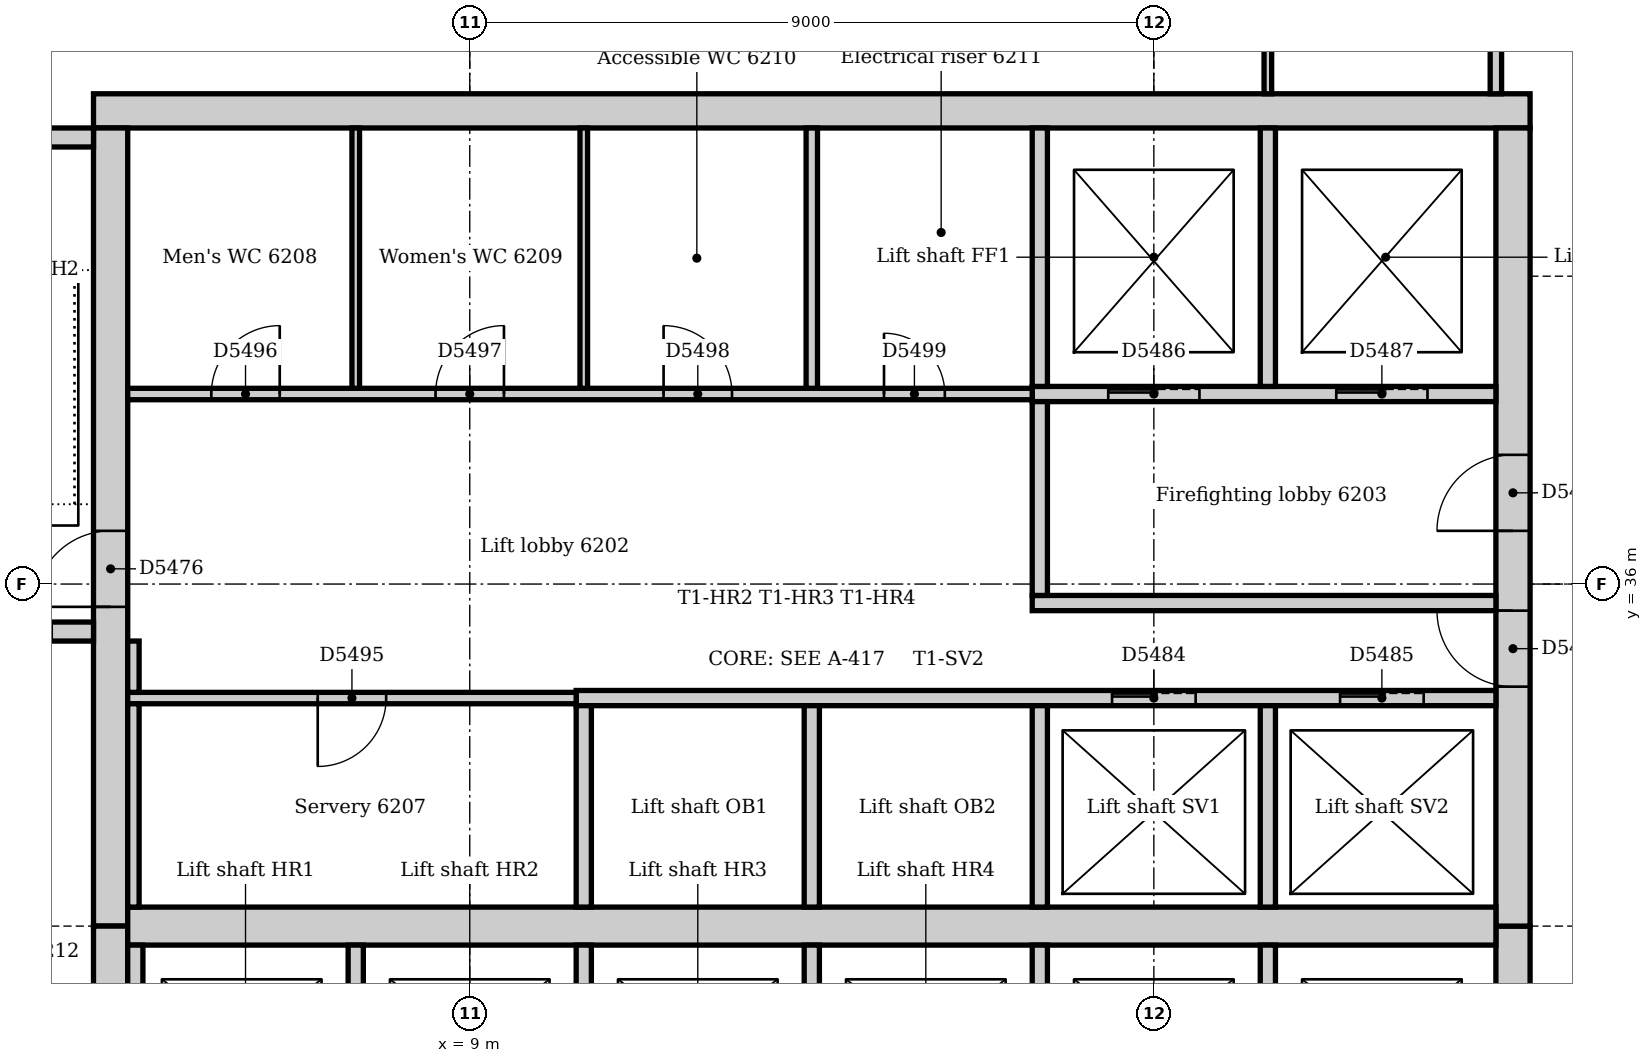
"""IFC4 building model, lengths in metres.
Left out: names, types, materials, properties, quantities, classifications, styles, units other than length and angle.
Written with IfcOpenShell. Run it as: python <this file> out.ifc"""

import sys

from ifc_helpers import new_model, si_unit, direction, frame, frame_2d, origin, place, context, subcontext, project, spatial, rectangle, extrude, element, fill, save


model = new_model("IFC4")
c1 = context("Model", 3, precision=1e-05, world=origin(), true_north=direction((0.0, 1.0)))
c2 = subcontext(c1, "Body", "Model", "MODEL_VIEW")
j1 = project(units=[si_unit("LENGTHUNIT", "METRE"), si_unit("PLANEANGLEUNIT", "RADIAN")], contexts=[c1])
p1 = place(None, origin())
s1 = spatial("IfcSite", under=j1, at=p1, CompositionType="ELEMENT")
p2 = place(p1, origin())
s2 = spatial("IfcBuilding", under=s1, at=p2, CompositionType="ELEMENT")
p3 = place(p2, frame((0.0, 0.0, 259.0)))
s3 = spatial("IfcBuildingStorey", under=s2, at=p3, CompositionType="ELEMENT", Elevation=259.0)
p4 = place(p3, frame((22.95, 42.225, 0.0), z_axis=(0.0, 0.0, 1.0), x_axis=(-1.0, 0.0, 0.0)))
e1 = element("IfcWall", 1, at=p4, inside=s3, PredefinedType="SOLIDWALL", context=c2, shape_type="SweptSolid", body=[
    extrude(rectangle(XDim=18.9, YDim=0.45, at=frame_2d((9.45, 0.0))), origin(), (0.0, 0.0, 1.0), 4.0),
])
p5 = place(p3, frame((22.725, 21.0, 0.0), z_axis=(0.0, 0.0, 1.0), x_axis=(0.0, 1.0, 0.0)))
e2 = element("IfcWall", 2, at=p5, inside=s3, PredefinedType="SOLIDWALL", context=c2, shape_type="SweptSolid", body=[
    extrude(rectangle(XDim=10.5, YDim=0.45, at=frame_2d((5.25, 0.0))), origin(), (0.0, 0.0, 1.0), 4.0),
])
p6 = place(p5, frame((4.35, 0.0, 0.0)))
e3 = element("IfcOpeningElement", 3, at=p6, cuts=e2, PredefinedType="OPENING", context=c2, shape_type="SweptSolid", body=[
    extrude(rectangle(XDim=1.8, YDim=2.1, at=frame_2d((0.9, 1.05))), frame((0.0, 0.235, 0.0), z_axis=(0.0, -1.0, 0.0), x_axis=(1.0, 0.0, 0.0)), (0.0, 0.0, 1.0), 0.47),
])
p7 = place(p3, frame((22.725, 31.5, 0.0), z_axis=(0.0, 0.0, 1.0), x_axis=(0.0, 1.0, 0.0)))
e4 = element("IfcWall", 4, at=p7, inside=s3, PredefinedType="SOLIDWALL", context=c2, shape_type="SweptSolid", body=[
    extrude(rectangle(XDim=10.5, YDim=0.45, at=frame_2d((5.25, 0.0))), origin(), (0.0, 0.0, 1.0), 4.0),
])
p8 = place(p7, frame((3.15, 0.0, 0.0)))
e5 = element("IfcOpeningElement", 5, at=p8, cuts=e4, PredefinedType="OPENING", context=c2, shape_type="SweptSolid", body=[
    extrude(rectangle(XDim=1.0, YDim=2.1, at=frame_2d((0.5, 1.05))), frame((0.0, 0.235, 0.0), z_axis=(0.0, -1.0, 0.0), x_axis=(1.0, 0.0, 0.0)), (0.0, 0.0, 1.0), 0.47),
])
p9 = place(p7, frame((5.2, 0.0, 0.0)))
e6 = element("IfcOpeningElement", 6, at=p9, cuts=e4, PredefinedType="OPENING", context=c2, shape_type="SweptSolid", body=[
    extrude(rectangle(XDim=1.0, YDim=2.1, at=frame_2d((0.5, 1.05))), frame((0.0, 0.235, 0.0), z_axis=(0.0, -1.0, 0.0), x_axis=(1.0, 0.0, 0.0)), (0.0, 0.0, 1.0), 0.47),
])
p10 = place(p3, frame((4.275, 42.0, 0.0), z_axis=(0.0, 0.0, 1.0), x_axis=(0.0, -1.0, 0.0)))
e7 = element("IfcWall", 7, at=p10, inside=s3, PredefinedType="SOLIDWALL", context=c2, shape_type="SweptSolid", body=[
    extrude(rectangle(XDim=10.5, YDim=0.45, at=frame_2d((5.25, 0.0))), origin(), (0.0, 0.0, 1.0), 4.0),
])
p11 = place(p10, frame((5.3, 0.0, 0.0)))
e8 = element("IfcOpeningElement", 8, at=p11, cuts=e7, PredefinedType="OPENING", context=c2, shape_type="SweptSolid", body=[
    extrude(rectangle(XDim=1.0, YDim=2.1, at=frame_2d((0.5, 1.05))), frame((0.0, 0.235, 0.0), z_axis=(0.0, -1.0, 0.0), x_axis=(1.0, 0.0, 0.0)), (0.0, 0.0, 1.0), 0.47),
])
p12 = place(p3, frame((4.275, 31.5, 0.0), z_axis=(0.0, 0.0, 1.0), x_axis=(0.0, -1.0, 0.0)))
e9 = element("IfcWall", 9, at=p12, inside=s3, PredefinedType="SOLIDWALL", context=c2, shape_type="SweptSolid", body=[
    extrude(rectangle(XDim=10.5, YDim=0.45, at=frame_2d((5.25, 0.0))), origin(), (0.0, 0.0, 1.0), 4.0),
])
p13 = place(p12, frame((4.25, 0.0, 0.0)))
e10 = element("IfcOpeningElement", 10, at=p13, cuts=e9, PredefinedType="OPENING", context=c2, shape_type="SweptSolid", body=[
    extrude(rectangle(XDim=1.0, YDim=2.1, at=frame_2d((0.5, 1.05))), frame((0.0, 0.235, 0.0), z_axis=(0.0, -1.0, 0.0), x_axis=(1.0, 0.0, 0.0)), (0.0, 0.0, 1.0), 0.47),
])
p14 = place(p3, frame((4.5, 31.5, 0.0), z_axis=(0.0, 0.0, 1.0), x_axis=(1.0, 0.0, 0.0)))
e11 = element("IfcWall", 11, at=p14, inside=s3, PredefinedType="SOLIDWALL", context=c2, shape_type="SweptSolid", body=[
    extrude(rectangle(XDim=18.0, YDim=0.5, at=frame_2d((9.0, 0.0))), origin(), (0.0, 0.0, 1.0), 4.0),
])
p15 = place(p3, frame((0.36, 35.375, 0.0), z_axis=(0.0, 0.0, 1.0), x_axis=(1.0, 0.0, 0.0)))
e12 = element("IfcWall", 12, at=p15, inside=s3, PredefinedType="SOLIDWALL", context=c2, shape_type="SweptSolid", body=[
    extrude(rectangle(XDim=3.69, YDim=0.25, at=frame_2d((1.845, 0.0))), origin(), (0.0, 0.0, 1.0), 4.0),
])
p16 = place(p15, frame((2.14, 0.0, 0.0)))
e13 = element("IfcOpeningElement", 13, at=p16, cuts=e12, PredefinedType="OPENING", context=c2, shape_type="SweptSolid", body=[
    extrude(rectangle(XDim=1.0, YDim=2.1, at=frame_2d((0.5, 1.05))), frame((0.0, 0.135, 0.0), z_axis=(0.0, -1.0, 0.0), x_axis=(1.0, 0.0, 0.0)), (0.0, 0.0, 1.0), 0.27),
])
p17 = place(p3, frame((4.05, 41.875, 0.0), z_axis=(0.0, 0.0, 1.0), x_axis=(-1.0, 0.0, 0.0)))
e14 = element("IfcWall", 14, at=p17, inside=s3, PredefinedType="SOLIDWALL", context=c2, shape_type="SweptSolid", body=[
    extrude(rectangle(XDim=3.69, YDim=0.25, at=frame_2d((1.845, 0.0))), origin(), (0.0, 0.0, 1.0), 4.0),
])
p18 = place(p3, frame((16.4, 35.75, 0.0), z_axis=(0.0, 0.0, 1.0), x_axis=(1.0, 0.0, 0.0)))
e15 = element("IfcWall", 15, at=p18, inside=s3, PredefinedType="PARTITIONING", context=c2, shape_type="SweptSolid", body=[
    extrude(rectangle(XDim=6.1, YDim=0.2, at=frame_2d((3.05, 0.0))), origin(), (0.0, 0.0, 1.0), 3.85),
])
p19 = place(p3, frame((16.4, 38.5, 0.0), z_axis=(0.0, 0.0, 1.0), x_axis=(1.0, 0.0, 0.0)))
e16 = element("IfcWall", 16, at=p19, inside=s3, PredefinedType="PARTITIONING", context=c2, shape_type="SweptSolid", body=[
    extrude(rectangle(XDim=6.1, YDim=0.2, at=frame_2d((3.05, 0.0))), origin(), (0.0, 0.0, 1.0), 3.85),
])
p20 = place(p19, frame((1.0, 0.0, 0.0)))
e17 = element("IfcOpeningElement", 17, at=p20, cuts=e16, PredefinedType="OPENING", context=c2, shape_type="SweptSolid", body=[
    extrude(rectangle(XDim=1.2, YDim=2.1, at=frame_2d((0.6, 1.05))), frame((0.0, 0.11, 0.0), z_axis=(0.0, -1.0, 0.0), x_axis=(1.0, 0.0, 0.0)), (0.0, 0.0, 1.0), 0.22),
])
p21 = place(p19, frame((4.0, 0.0, 0.0)))
e18 = element("IfcOpeningElement", 18, at=p21, cuts=e16, PredefinedType="OPENING", context=c2, shape_type="SweptSolid", body=[
    extrude(rectangle(XDim=1.2, YDim=2.1, at=frame_2d((0.6, 1.05))), frame((0.0, 0.11, 0.0), z_axis=(0.0, -1.0, 0.0), x_axis=(1.0, 0.0, 0.0)), (0.0, 0.0, 1.0), 0.22),
])
p22 = place(p3, frame((16.5, 35.85, 0.0), z_axis=(0.0, 0.0, 1.0), x_axis=(0.0, 1.0, 0.0)))
e19 = element("IfcWall", 19, at=p22, inside=s3, PredefinedType="PARTITIONING", context=c2, shape_type="SweptSolid", body=[
    extrude(rectangle(XDim=2.55, YDim=0.2, at=frame_2d((1.275, 0.0))), origin(), (0.0, 0.0, 1.0), 3.85),
])
p23 = place(p3, frame((10.4, 34.5, 0.0), z_axis=(0.0, 0.0, 1.0), x_axis=(1.0, 0.0, 0.0)))
e20 = element("IfcWall", 20, at=p23, inside=s3, PredefinedType="PARTITIONING", context=c2, shape_type="SweptSolid", body=[
    extrude(rectangle(XDim=12.1, YDim=0.2, at=frame_2d((6.05, 0.0))), origin(), (0.0, 0.0, 1.0), 3.85),
])
p24 = place(p23, frame((7.05, 0.0, 0.0)))
e21 = element("IfcOpeningElement", 21, at=p24, cuts=e20, PredefinedType="OPENING", context=c2, shape_type="SweptSolid", body=[
    extrude(rectangle(XDim=1.1, YDim=2.1, at=frame_2d((0.55, 1.05))), frame((0.0, 0.11, 0.0), z_axis=(0.0, -1.0, 0.0), x_axis=(1.0, 0.0, 0.0)), (0.0, 0.0, 1.0), 0.22),
])
p25 = place(p23, frame((10.05, 0.0, 0.0)))
e22 = element("IfcOpeningElement", 22, at=p25, cuts=e20, PredefinedType="OPENING", context=c2, shape_type="SweptSolid", body=[
    extrude(rectangle(XDim=1.1, YDim=2.1, at=frame_2d((0.55, 1.05))), frame((0.0, 0.11, 0.0), z_axis=(0.0, -1.0, 0.0), x_axis=(1.0, 0.0, 0.0)), (0.0, 0.0, 1.0), 0.22),
])
for number, where, z_axis, x_axis in (
    (23, (10.5, 28.6, 0.0), (0.0, 0.0, 1.0), (0.0, 1.0, 0.0)),
    (24, (10.5, 31.75, 0.0), (0.0, 0.0, 1.0), (0.0, 1.0, 0.0)),
    (25, (13.5, 28.6, 0.0), (0.0, 0.0, 1.0), (0.0, 1.0, 0.0)),
    (26, (13.5, 31.75, 0.0), (0.0, 0.0, 1.0), (0.0, 1.0, 0.0)),
    (27, (16.5, 28.6, 0.0), (0.0, 0.0, 1.0), (0.0, 1.0, 0.0)),
    (28, (16.5, 31.75, 0.0), (0.0, 0.0, 1.0), (0.0, 1.0, 0.0)),
    (29, (19.5, 28.6, 0.0), (0.0, 0.0, 1.0), (0.0, 1.0, 0.0)),
    (30, (19.5, 31.75, 0.0), (0.0, 0.0, 1.0), (0.0, 1.0, 0.0)),
):
    element("IfcWall", number, at=place(p3, frame(where, z_axis=z_axis, x_axis=x_axis)), inside=s3, PredefinedType="PARTITIONING", context=c2, shape_type="SweptSolid", body=[
        extrude(rectangle(XDim=2.65, YDim=0.2, at=frame_2d((1.325, 0.0))), origin(), (0.0, 0.0, 1.0), 3.85),
    ])
for number, where, z_axis, x_axis in (
    (31, (16.5, 38.6, 0.0), (0.0, 0.0, 1.0), (0.0, 1.0, 0.0)),
    (32, (19.5, 38.6, 0.0), (0.0, 0.0, 1.0), (0.0, 1.0, 0.0)),
):
    element("IfcWall", number, at=place(p3, frame(where, z_axis=z_axis, x_axis=x_axis)), inside=s3, PredefinedType="PARTITIONING", context=c2, shape_type="SweptSolid", body=[
        extrude(rectangle(XDim=3.4, YDim=0.2, at=frame_2d((1.7, 0.0))), origin(), (0.0, 0.0, 1.0), 3.85),
    ])
for number, where, z_axis, x_axis in (
    (33, (4.6, 28.6, 0.0), (0.0, 0.0, 1.0), (0.0, 1.0, 0.0)),
    (34, (7.5, 28.6, 0.0), (0.0, 0.0, 1.0), (0.0, 1.0, 0.0)),
):
    element("IfcWall", number, at=place(p3, frame(where, z_axis=z_axis, x_axis=x_axis)), inside=s3, PredefinedType="PARTITIONING", context=c2, shape_type="SweptSolid", body=[
        extrude(rectangle(XDim=2.65, YDim=0.2, at=frame_2d((1.325, 0.0))), origin(), (0.0, 0.0, 1.0), 3.85),
    ])
p26 = place(p3, frame((4.5, 38.5, 0.0), z_axis=(0.0, 0.0, 1.0), x_axis=(1.0, 0.0, 0.0)))
e35 = element("IfcWall", 35, at=p26, inside=s3, PredefinedType="PARTITIONING", context=c2, shape_type="SweptSolid", body=[
    extrude(rectangle(XDim=11.9, YDim=0.15, at=frame_2d((5.95, 0.0))), origin(), (0.0, 0.0, 1.0), 3.85),
])
p27 = place(p26, frame((1.1, 0.0, 0.0)))
e36 = element("IfcOpeningElement", 36, at=p27, cuts=e35, PredefinedType="OPENING", context=c2, shape_type="SweptSolid", body=[
    extrude(rectangle(XDim=0.9, YDim=2.1, at=frame_2d((0.45, 1.05))), frame((0.0, 0.085, 0.0), z_axis=(0.0, -1.0, 0.0), x_axis=(1.0, 0.0, 0.0)), (0.0, 0.0, 1.0), 0.17),
])
p28 = place(p26, frame((4.05, 0.0, 0.0)))
e37 = element("IfcOpeningElement", 37, at=p28, cuts=e35, PredefinedType="OPENING", context=c2, shape_type="SweptSolid", body=[
    extrude(rectangle(XDim=0.9, YDim=2.1, at=frame_2d((0.45, 1.05))), frame((0.0, 0.085, 0.0), z_axis=(0.0, -1.0, 0.0), x_axis=(1.0, 0.0, 0.0)), (0.0, 0.0, 1.0), 0.17),
])
p29 = place(p26, frame((7.05, 0.0, 0.0)))
e38 = element("IfcOpeningElement", 38, at=p29, cuts=e35, PredefinedType="OPENING", context=c2, shape_type="SweptSolid", body=[
    extrude(rectangle(XDim=0.9, YDim=2.1, at=frame_2d((0.45, 1.05))), frame((0.0, 0.085, 0.0), z_axis=(0.0, -1.0, 0.0), x_axis=(1.0, 0.0, 0.0)), (0.0, 0.0, 1.0), 0.17),
])
p30 = place(p26, frame((9.95, 0.0, 0.0)))
e39 = element("IfcOpeningElement", 39, at=p30, cuts=e35, PredefinedType="OPENING", context=c2, shape_type="SweptSolid", body=[
    extrude(rectangle(XDim=0.8, YDim=2.1, at=frame_2d((0.4, 1.05))), frame((0.0, 0.085, 0.0), z_axis=(0.0, -1.0, 0.0), x_axis=(1.0, 0.0, 0.0)), (0.0, 0.0, 1.0), 0.17),
])
p31 = place(p3, frame((4.5, 34.5, 0.0), z_axis=(0.0, 0.0, 1.0), x_axis=(1.0, 0.0, 0.0)))
e40 = element("IfcWall", 40, at=p31, inside=s3, PredefinedType="PARTITIONING", context=c2, shape_type="SweptSolid", body=[
    extrude(rectangle(XDim=5.9, YDim=0.15, at=frame_2d((2.95, 0.0))), origin(), (0.0, 0.0, 1.0), 3.85),
])
p32 = place(p31, frame((2.5, 0.0, 0.0)))
e41 = element("IfcOpeningElement", 41, at=p32, cuts=e40, PredefinedType="OPENING", context=c2, shape_type="SweptSolid", body=[
    extrude(rectangle(XDim=0.9, YDim=2.1, at=frame_2d((0.45, 1.05))), frame((0.0, 0.085, 0.0), z_axis=(0.0, -1.0, 0.0), x_axis=(1.0, 0.0, 0.0)), (0.0, 0.0, 1.0), 0.17),
])
p33 = place(p3, frame((4.575, 34.575, 0.0), z_axis=(0.0, 0.0, 1.0), x_axis=(0.0, 1.0, 0.0)))
e42 = element("IfcWall", 42, at=p33, inside=s3, PredefinedType="PARTITIONING", context=c2, shape_type="SweptSolid", body=[
    extrude(rectangle(XDim=0.675, YDim=0.15, at=frame_2d((0.338, 0.0))), origin(), (0.0, 0.0, 1.0), 3.85),
])
p34 = place(p3, frame((4.575, 31.75, 0.0), z_axis=(0.0, 0.0, 1.0), x_axis=(0.0, 1.0, 0.0)))
e43 = element("IfcWall", 43, at=p34, inside=s3, PredefinedType="PARTITIONING", context=c2, shape_type="SweptSolid", body=[
    extrude(rectangle(XDim=2.675, YDim=0.15, at=frame_2d((1.337, 0.0))), origin(), (0.0, 0.0, 1.0), 3.85),
])
p35 = place(p3, frame((22.5, 42.45, 0.0), z_axis=(0.0, 0.0, 1.0), x_axis=(0.0, 1.0, 0.0)))
e44 = element("IfcWall", 44, at=p35, inside=s3, PredefinedType="PARTITIONING", context=c2, shape_type="SweptSolid", body=[
    extrude(rectangle(XDim=2.475, YDim=0.15, at=frame_2d((1.238, 0.0))), origin(), (0.0, 0.0, 1.0), 3.85),
])
p36 = place(p3, frame((13.5, 38.575, 0.0), z_axis=(0.0, 0.0, 1.0), x_axis=(0.0, 1.0, 0.0)))
e45 = element("IfcWall", 45, at=p36, inside=s3, PredefinedType="PARTITIONING", context=c2, shape_type="SweptSolid", body=[
    extrude(rectangle(XDim=3.425, YDim=0.15, at=frame_2d((1.712, 0.0))), origin(), (0.0, 0.0, 1.0), 3.85),
])
p37 = place(p3, frame((19.5, 42.45, 0.0), z_axis=(0.0, 0.0, 1.0), x_axis=(0.0, 1.0, 0.0)))
e46 = element("IfcWall", 46, at=p37, inside=s3, PredefinedType="PARTITIONING", context=c2, shape_type="SweptSolid", body=[
    extrude(rectangle(XDim=20.19, YDim=0.1, at=frame_2d((10.095, 0.0))), origin(), (0.0, 0.0, 1.0), 3.85),
])
p38 = place(p37, frame((9.4, 0.0, 0.0)))
e47 = element("IfcOpeningElement", 47, at=p38, cuts=e46, PredefinedType="OPENING", context=c2, shape_type="SweptSolid", body=[
    extrude(rectangle(XDim=0.9, YDim=2.1, at=frame_2d((0.45, 1.05))), frame((0.0, 0.06, 0.0), z_axis=(0.0, -1.0, 0.0), x_axis=(1.0, 0.0, 0.0)), (0.0, 0.0, 1.0), 0.12),
])
for number, where, z_axis, x_axis in (
    (48, (7.5, 38.575, 0.0), (0.0, 0.0, 1.0), (0.0, 1.0, 0.0)),
    (49, (10.5, 38.575, 0.0), (0.0, 0.0, 1.0), (0.0, 1.0, 0.0)),
):
    element("IfcWall", number, at=place(p3, frame(where, z_axis=z_axis, x_axis=x_axis)), inside=s3, PredefinedType="PARTITIONING", context=c2, shape_type="SweptSolid", body=[
        extrude(rectangle(XDim=3.425, YDim=0.1, at=frame_2d((1.712, 0.0))), origin(), (0.0, 0.0, 1.0), 3.85),
    ])
p39 = place(p11, frame((1.0, 0.0, 0.0), z_axis=(0.0, 0.0, 1.0), x_axis=(-1.0, 0.0, 0.0)))
e50 = element("IfcDoor", 50, at=p39, inside=s3, OperationType="SINGLE_SWING_LEFT", PredefinedType="DOOR", context=c2, shape_type="SweptSolid", body=[
    extrude(rectangle(XDim=1.0, YDim=2.1, at=frame_2d((0.5, 1.05))), frame((0.0, 0.025, 0.0), z_axis=(0.0, -1.0, 0.0), x_axis=(1.0, 0.0, 0.0)), (0.0, 0.0, 1.0), 0.05),
])
fill(e8, e50)
p40 = place(p24, origin())
e51 = element("IfcDoor", 51, at=p40, inside=s3, OperationType="SLIDING_TO_LEFT", PredefinedType="DOOR", context=c2, shape_type="SweptSolid", body=[
    extrude(rectangle(XDim=1.1, YDim=2.1, at=frame_2d((0.55, 1.05))), frame((0.0, 0.025, 0.0), z_axis=(0.0, -1.0, 0.0), x_axis=(1.0, 0.0, 0.0)), (0.0, 0.0, 1.0), 0.05),
])
fill(e21, e51)
p41 = place(p25, origin())
e52 = element("IfcDoor", 52, at=p41, inside=s3, OperationType="SLIDING_TO_LEFT", PredefinedType="DOOR", context=c2, shape_type="SweptSolid", body=[
    extrude(rectangle(XDim=1.1, YDim=2.1, at=frame_2d((0.55, 1.05))), frame((0.0, 0.025, 0.0), z_axis=(0.0, -1.0, 0.0), x_axis=(1.0, 0.0, 0.0)), (0.0, 0.0, 1.0), 0.05),
])
fill(e22, e52)
p42 = place(p20, origin())
e53 = element("IfcDoor", 53, at=p42, inside=s3, OperationType="SLIDING_TO_LEFT", PredefinedType="DOOR", context=c2, shape_type="SweptSolid", body=[
    extrude(rectangle(XDim=1.2, YDim=2.1, at=frame_2d((0.6, 1.05))), frame((0.0, 0.025, 0.0), z_axis=(0.0, -1.0, 0.0), x_axis=(1.0, 0.0, 0.0)), (0.0, 0.0, 1.0), 0.05),
])
fill(e17, e53)
p43 = place(p21, origin())
e54 = element("IfcDoor", 54, at=p43, inside=s3, OperationType="SLIDING_TO_LEFT", PredefinedType="DOOR", context=c2, shape_type="SweptSolid", body=[
    extrude(rectangle(XDim=1.2, YDim=2.1, at=frame_2d((0.6, 1.05))), frame((0.0, 0.025, 0.0), z_axis=(0.0, -1.0, 0.0), x_axis=(1.0, 0.0, 0.0)), (0.0, 0.0, 1.0), 0.05),
])
fill(e18, e54)
p44 = place(p8, origin())
e55 = element("IfcDoor", 55, at=p44, inside=s3, OperationType="SINGLE_SWING_RIGHT", PredefinedType="DOOR", context=c2, shape_type="SweptSolid", body=[
    extrude(rectangle(XDim=1.0, YDim=2.1, at=frame_2d((0.5, 1.05))), frame((0.0, 0.025, 0.0), z_axis=(0.0, -1.0, 0.0), x_axis=(1.0, 0.0, 0.0)), (0.0, 0.0, 1.0), 0.05),
])
fill(e5, e55)
p45 = place(p9, origin())
e56 = element("IfcDoor", 56, at=p45, inside=s3, OperationType="SINGLE_SWING_LEFT", PredefinedType="DOOR", context=c2, shape_type="SweptSolid", body=[
    extrude(rectangle(XDim=1.0, YDim=2.1, at=frame_2d((0.5, 1.05))), frame((0.0, 0.025, 0.0), z_axis=(0.0, -1.0, 0.0), x_axis=(1.0, 0.0, 0.0)), (0.0, 0.0, 1.0), 0.05),
])
fill(e6, e56)
p46 = place(p32, frame((0.9, 0.0, 0.0), z_axis=(0.0, 0.0, 1.0), x_axis=(-1.0, 0.0, 0.0)))
e57 = element("IfcDoor", 57, at=p46, inside=s3, OperationType="SINGLE_SWING_RIGHT", PredefinedType="DOOR", context=c2, shape_type="SweptSolid", body=[
    extrude(rectangle(XDim=0.9, YDim=2.1, at=frame_2d((0.45, 1.05))), frame((0.0, 0.025, 0.0), z_axis=(0.0, -1.0, 0.0), x_axis=(1.0, 0.0, 0.0)), (0.0, 0.0, 1.0), 0.05),
])
fill(e41, e57)
p47 = place(p27, origin())
e58 = element("IfcDoor", 58, at=p47, inside=s3, OperationType="SINGLE_SWING_RIGHT", PredefinedType="DOOR", context=c2, shape_type="SweptSolid", body=[
    extrude(rectangle(XDim=0.9, YDim=2.1, at=frame_2d((0.45, 1.05))), frame((0.0, 0.025, 0.0), z_axis=(0.0, -1.0, 0.0), x_axis=(1.0, 0.0, 0.0)), (0.0, 0.0, 1.0), 0.05),
])
fill(e36, e58)
p48 = place(p28, origin())
e59 = element("IfcDoor", 59, at=p48, inside=s3, OperationType="SINGLE_SWING_RIGHT", PredefinedType="DOOR", context=c2, shape_type="SweptSolid", body=[
    extrude(rectangle(XDim=0.9, YDim=2.1, at=frame_2d((0.45, 1.05))), frame((0.0, 0.025, 0.0), z_axis=(0.0, -1.0, 0.0), x_axis=(1.0, 0.0, 0.0)), (0.0, 0.0, 1.0), 0.05),
])
fill(e37, e59)
p49 = place(p29, origin())
e60 = element("IfcDoor", 60, at=p49, inside=s3, OperationType="SINGLE_SWING_LEFT", PredefinedType="DOOR", context=c2, shape_type="SweptSolid", body=[
    extrude(rectangle(XDim=0.9, YDim=2.1, at=frame_2d((0.45, 1.05))), frame((0.0, 0.025, 0.0), z_axis=(0.0, -1.0, 0.0), x_axis=(1.0, 0.0, 0.0)), (0.0, 0.0, 1.0), 0.05),
])
fill(e38, e60)
p50 = place(p30, origin())
e61 = element("IfcDoor", 61, at=p50, inside=s3, OperationType="SINGLE_SWING_LEFT", PredefinedType="DOOR", context=c2, shape_type="SweptSolid", body=[
    extrude(rectangle(XDim=0.8, YDim=2.1, at=frame_2d((0.4, 1.05))), frame((0.0, 0.025, 0.0), z_axis=(0.0, -1.0, 0.0), x_axis=(1.0, 0.0, 0.0)), (0.0, 0.0, 1.0), 0.05),
])
fill(e39, e61)
save(model, sys.argv[1])
